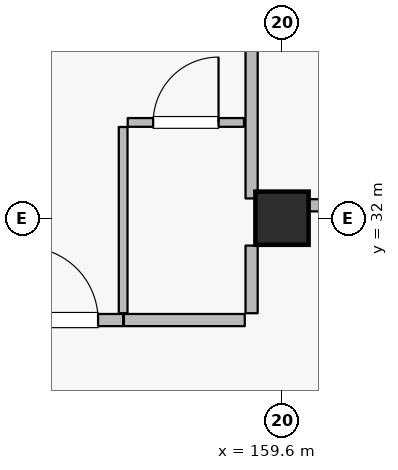
"""IFC4 building model, lengths in metres.
Left out: names, types, materials, properties, quantities, classifications, styles, units other than length and angle.
Written with IfcOpenShell. Run it as: python <this file> out.ifc"""

import sys

from ifc_helpers import new_model, si_unit, direction, frame, frame_2d, origin, origin_2d, place, context, subcontext, project, spatial, rectangle, extrude, element, fill, save


model = new_model("IFC4")
c1 = context("Model", 3, precision=1e-05, world=origin(), true_north=direction((0.0, 1.0)))
c2 = subcontext(c1, "Body", "Model", "MODEL_VIEW")
j1 = project(units=[si_unit("LENGTHUNIT", "METRE"), si_unit("PLANEANGLEUNIT", "RADIAN")], contexts=[c1])
p1 = place(None, origin())
s1 = spatial("IfcSite", under=j1, at=p1, CompositionType="ELEMENT")
p2 = place(p1, origin())
s2 = spatial("IfcBuilding", under=s1, at=p2, CompositionType="ELEMENT")
p3 = place(p2, frame((0.0, 0.0, 25.2)))
s3 = spatial("IfcBuildingStorey", under=s2, at=p3, CompositionType="ELEMENT", Elevation=25.2)
p4 = place(p3, frame((159.6, 32.0, 0.0), z_axis=(0.0, 0.0, 1.0), x_axis=(1.0, 0.0, 0.0)))
e1 = element("IfcColumn", 1, at=p4, inside=s3, PredefinedType="COLUMN", context=c2, shape_type="SweptSolid", body=[
    extrude(rectangle(XDim=0.7, YDim=0.7, at=origin_2d()), origin(), (0.0, 0.0, 1.0), 3.6),
])
p5 = place(p3, frame((155.89, 30.66, 0.0), z_axis=(0.0, 0.0, 1.0), x_axis=(1.0, 0.0, 0.0)))
e2 = element("IfcWall", 2, at=p5, inside=s3, PredefinedType="PARTITIONING", context=c2, shape_type="SweptSolid", body=[
    extrude(rectangle(XDim=1.62, YDim=0.16, at=frame_2d((0.81, 0.0))), origin(), (0.0, 0.0, 1.0), 3.335),
])
p6 = place(p5, frame((0.33, 0.0, 0.0)))
e3 = element("IfcOpeningElement", 3, at=p6, cuts=e2, PredefinedType="OPENING", context=c2, shape_type="SweptSolid", body=[
    extrude(rectangle(XDim=0.96, YDim=2.2, at=frame_2d((0.48, 1.1))), frame((0.0, 0.09, 0.0), z_axis=(0.0, -1.0, 0.0), x_axis=(1.0, 0.0, 0.0)), (0.0, 0.0, 1.0), 0.18),
])
p7 = place(p3, frame((157.52, 30.66, 0.0), z_axis=(0.0, 0.0, 1.0), x_axis=(1.0, 0.0, 0.0)))
e4 = element("IfcWall", 4, at=p7, inside=s3, PredefinedType="PARTITIONING", context=c2, shape_type="SweptSolid", body=[
    extrude(rectangle(XDim=1.59, YDim=0.16, at=frame_2d((0.795, 0.0))), origin(), (0.0, 0.0, 1.0), 3.335),
])
p8 = place(p3, frame((157.51, 30.75, 0.0), z_axis=(0.0, 0.0, 1.0), x_axis=(0.0, 1.0, 0.0)))
e5 = element("IfcWall", 5, at=p8, inside=s3, PredefinedType="PARTITIONING", context=c2, shape_type="SweptSolid", body=[
    extrude(rectangle(XDim=2.45, YDim=0.115, at=frame_2d((1.225, 0.0))), origin(), (0.0, 0.0, 1.0), 3.335),
])
p9 = place(p3, frame((157.57, 33.26, 0.0), z_axis=(0.0, 0.0, 1.0), x_axis=(1.0, 0.0, 0.0)))
e6 = element("IfcWall", 6, at=p9, inside=s3, PredefinedType="PARTITIONING", context=c2, shape_type="SweptSolid", body=[
    extrude(rectangle(XDim=1.53, YDim=0.115, at=frame_2d((0.765, 0.0))), origin(), (0.0, 0.0, 1.0), 3.335),
])
p10 = place(p9, frame((0.335, 0.0, 0.0)))
e7 = element("IfcOpeningElement", 7, at=p10, cuts=e6, PredefinedType="OPENING", context=c2, shape_type="SweptSolid", body=[
    extrude(rectangle(XDim=0.86, YDim=2.12, at=frame_2d((0.43, 1.06))), frame((0.0, 0.067, 0.0), z_axis=(0.0, -1.0, 0.0), x_axis=(1.0, 0.0, 0.0)), (0.0, 0.0, 1.0), 0.135),
])
p11 = place(p3, frame((159.2, 30.75, 0.0), z_axis=(0.0, 0.0, 1.0), x_axis=(0.0, 1.0, 0.0)))
e8 = element("IfcWall", 8, at=p11, inside=s3, PredefinedType="PARTITIONING", context=c2, shape_type="SweptSolid", body=[
    extrude(rectangle(XDim=0.89, YDim=0.16, at=frame_2d((0.445, 0.0))), origin(), (0.0, 0.0, 1.0), 3.335),
])
p12 = place(p3, frame((159.29, 32.17, 0.0), z_axis=(0.0, 0.0, 1.0), x_axis=(1.0, 0.0, 0.0)))
e9 = element("IfcWall", 9, at=p12, inside=s3, PredefinedType="PARTITIONING", context=c2, shape_type="SweptSolid", body=[
    extrude(rectangle(XDim=1.59, YDim=0.16, at=frame_2d((0.795, 0.0))), origin(), (0.0, 0.0, 1.0), 3.335),
])
p13 = place(p3, frame((159.2, 32.26, 0.0), z_axis=(0.0, 0.0, 1.0), x_axis=(0.0, 1.0, 0.0)))
e10 = element("IfcWall", 10, at=p13, inside=s3, PredefinedType="PARTITIONING", context=c2, shape_type="SweptSolid", body=[
    extrude(rectangle(XDim=7.4, YDim=0.16, at=frame_2d((3.7, 0.0))), origin(), (0.0, 0.0, 1.0), 3.335),
])
p14 = place(p6, origin())
e11 = element("IfcDoor", 11, at=p14, inside=s3, OperationType="SINGLE_SWING_LEFT", PredefinedType="DOOR", context=c2, shape_type="SweptSolid", body=[
    extrude(rectangle(XDim=0.96, YDim=2.2, at=frame_2d((0.48, 1.1))), frame((0.0, 0.025, 0.0), z_axis=(0.0, -1.0, 0.0), x_axis=(1.0, 0.0, 0.0)), (0.0, 0.0, 1.0), 0.05),
])
fill(e3, e11)
p15 = place(p10, origin())
e12 = element("IfcDoor", 12, at=p15, inside=s3, OperationType="SINGLE_SWING_RIGHT", PredefinedType="DOOR", context=c2, shape_type="SweptSolid", body=[
    extrude(rectangle(XDim=0.86, YDim=2.12, at=frame_2d((0.43, 1.06))), frame((0.0, 0.025, 0.0), z_axis=(0.0, -1.0, 0.0), x_axis=(1.0, 0.0, 0.0)), (0.0, 0.0, 1.0), 0.05),
])
fill(e7, e12)
save(model, sys.argv[1])
